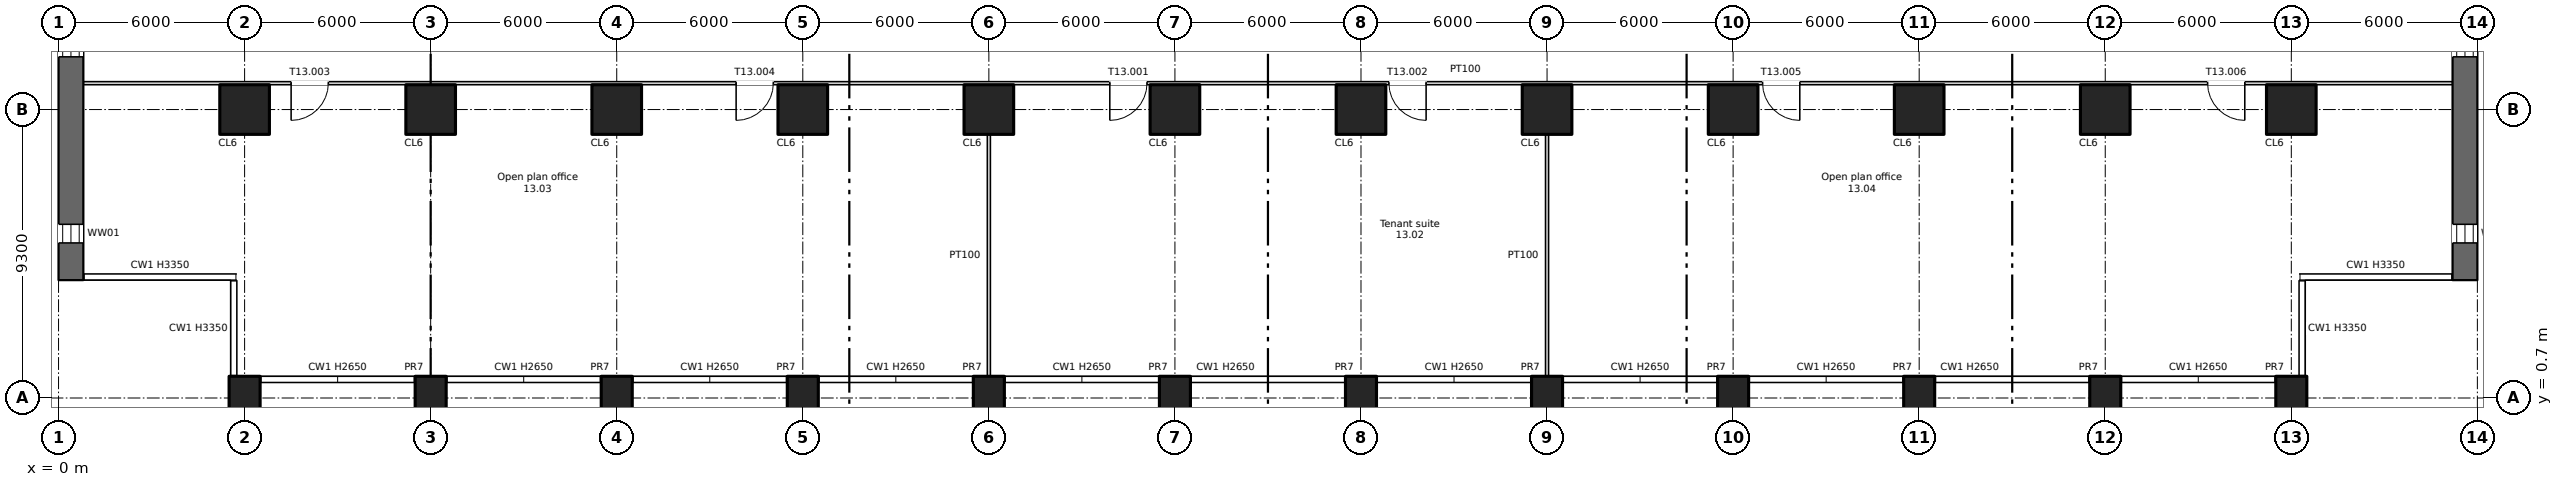
"""IFC4 building model, lengths in metres.
Left out: names, types, materials, properties, quantities, classifications, styles, units other than length and angle.
Written with IfcOpenShell. Run it as: python <this file> out.ifc"""

import sys

from ifc_helpers import new_model, si_unit, direction, frame, frame_2d, origin, origin_2d, place, context, subcontext, project, spatial, rectangle, extrude, element, fill, save


model = new_model("IFC4")
c1 = context("Model", 3, precision=1e-05, world=origin(), true_north=direction((0.0, 1.0)))
c2 = subcontext(c1, "Body", "Model", "MODEL_VIEW")
j1 = project(units=[si_unit("LENGTHUNIT", "METRE"), si_unit("PLANEANGLEUNIT", "RADIAN")], contexts=[c1])
p1 = place(None, origin())
s1 = spatial("IfcSite", under=j1, at=p1, CompositionType="ELEMENT")
p2 = place(p1, origin())
s2 = spatial("IfcBuilding", under=s1, at=p2, CompositionType="ELEMENT")
p3 = place(p2, frame((0.0, 0.0, 67.5)))
s3 = spatial("IfcBuildingStorey", under=s2, at=p3, CompositionType="ELEMENT", Elevation=67.5)
for number, where, z_axis, x_axis in (
    (1, (6.0, 0.7, -0.4), (0.0, 0.0, 1.0), (1.0, 0.0, 0.0)),
    (2, (12.0, 0.7, -0.4), (0.0, 0.0, 1.0), (1.0, 0.0, 0.0)),
    (3, (18.0, 0.7, -0.4), (0.0, 0.0, 1.0), (1.0, 0.0, 0.0)),
    (4, (24.0, 0.7, -0.4), (0.0, 0.0, 1.0), (1.0, 0.0, 0.0)),
    (5, (30.0, 0.7, -0.4), (0.0, 0.0, 1.0), (1.0, 0.0, 0.0)),
    (6, (36.0, 0.7, -0.4), (0.0, 0.0, 1.0), (1.0, 0.0, 0.0)),
    (7, (42.0, 0.7, -0.4), (0.0, 0.0, 1.0), (1.0, 0.0, 0.0)),
    (8, (48.0, 0.7, -0.4), (0.0, 0.0, 1.0), (1.0, 0.0, 0.0)),
    (9, (54.0, 0.7, -0.4), (0.0, 0.0, 1.0), (1.0, 0.0, 0.0)),
    (10, (60.0, 0.7, -0.4), (0.0, 0.0, 1.0), (1.0, 0.0, 0.0)),
    (11, (66.0, 0.7, -0.4), (0.0, 0.0, 1.0), (1.0, 0.0, 0.0)),
    (12, (72.0, 0.7, -0.4), (0.0, 0.0, 1.0), (1.0, 0.0, 0.0)),
):
    element("IfcColumn", number, at=place(p3, frame(where, z_axis=z_axis, x_axis=x_axis)), inside=s3, PredefinedType="COLUMN", context=c2, shape_type="SweptSolid", body=[
        extrude(rectangle(XDim=1.0, YDim=1.4, at=origin_2d()), origin(), (0.0, 0.0, 1.0), 3.75),
    ])
for number, where, z_axis, x_axis in (
    (13, (6.0, 10.0, 0.0), (0.0, 0.0, 1.0), (1.0, 0.0, 0.0)),
    (14, (12.0, 10.0, 0.0), (0.0, 0.0, 1.0), (1.0, 0.0, 0.0)),
    (15, (18.0, 10.0, 0.0), (0.0, 0.0, 1.0), (1.0, 0.0, 0.0)),
    (16, (24.0, 10.0, 0.0), (0.0, 0.0, 1.0), (1.0, 0.0, 0.0)),
    (17, (30.0, 10.0, 0.0), (0.0, 0.0, 1.0), (1.0, 0.0, 0.0)),
    (18, (36.0, 10.0, 0.0), (0.0, 0.0, 1.0), (1.0, 0.0, 0.0)),
    (19, (42.0, 10.0, 0.0), (0.0, 0.0, 1.0), (1.0, 0.0, 0.0)),
    (20, (48.0, 10.0, 0.0), (0.0, 0.0, 1.0), (1.0, 0.0, 0.0)),
    (21, (54.0, 10.0, 0.0), (0.0, 0.0, 1.0), (1.0, 0.0, 0.0)),
    (22, (60.0, 10.0, 0.0), (0.0, 0.0, 1.0), (1.0, 0.0, 0.0)),
    (23, (66.0, 10.0, 0.0), (0.0, 0.0, 1.0), (1.0, 0.0, 0.0)),
    (24, (72.0, 10.0, 0.0), (0.0, 0.0, 1.0), (1.0, 0.0, 0.0)),
):
    element("IfcColumn", number, at=place(p3, frame(where, z_axis=z_axis, x_axis=x_axis)), inside=s3, PredefinedType="COLUMN", context=c2, shape_type="SweptSolid", body=[
        extrude(rectangle(XDim=1.6, YDim=1.6, at=origin_2d()), origin(), (0.0, 0.0, 1.0), 3.35),
    ])
p4 = place(p3, frame((0.4, 4.5, 0.0), z_axis=(0.0, 0.0, 1.0), x_axis=(0.0, 1.0, 0.0)))
e25 = element("IfcWall", 25, at=p4, inside=s3, PredefinedType="SHEAR", context=c2, shape_type="SweptSolid", body=[
    extrude(rectangle(XDim=37.0, YDim=0.8, at=frame_2d((18.5, 0.0))), origin(), (0.0, 0.0, 1.0), 3.35),
])
p5 = place(p4, frame((1.2, 0.0, 0.6)))
e26 = element("IfcOpeningElement", 26, at=p5, cuts=e25, PredefinedType="OPENING", context=c2, shape_type="SweptSolid", body=[
    extrude(rectangle(XDim=0.6, YDim=2.4, at=frame_2d((0.3, 1.2))), frame((0.0, 0.41, 0.0), z_axis=(0.0, -1.0, 0.0), x_axis=(1.0, 0.0, 0.0)), (0.0, 0.0, 1.0), 0.82),
])
p6 = place(p4, frame((7.2, 0.0, 0.6)))
e27 = element("IfcOpeningElement", 27, at=p6, cuts=e25, PredefinedType="OPENING", context=c2, shape_type="SweptSolid", body=[
    extrude(rectangle(XDim=0.6, YDim=2.4, at=frame_2d((0.3, 1.2))), frame((0.0, 0.41, 0.0), z_axis=(0.0, -1.0, 0.0), x_axis=(1.0, 0.0, 0.0)), (0.0, 0.0, 1.0), 0.82),
])
p7 = place(p4, frame((13.2, 0.0, 0.6)))
e28 = element("IfcOpeningElement", 28, at=p7, cuts=e25, PredefinedType="OPENING", context=c2, shape_type="SweptSolid", body=[
    extrude(rectangle(XDim=0.6, YDim=2.4, at=frame_2d((0.3, 1.2))), frame((0.0, 0.41, 0.0), z_axis=(0.0, -1.0, 0.0), x_axis=(1.0, 0.0, 0.0)), (0.0, 0.0, 1.0), 0.82),
])
p8 = place(p4, frame((19.2, 0.0, 0.6)))
e29 = element("IfcOpeningElement", 29, at=p8, cuts=e25, PredefinedType="OPENING", context=c2, shape_type="SweptSolid", body=[
    extrude(rectangle(XDim=0.6, YDim=2.4, at=frame_2d((0.3, 1.2))), frame((0.0, 0.41, 0.0), z_axis=(0.0, -1.0, 0.0), x_axis=(1.0, 0.0, 0.0)), (0.0, 0.0, 1.0), 0.82),
])
p9 = place(p4, frame((25.2, 0.0, 0.6)))
e30 = element("IfcOpeningElement", 30, at=p9, cuts=e25, PredefinedType="OPENING", context=c2, shape_type="SweptSolid", body=[
    extrude(rectangle(XDim=0.6, YDim=2.4, at=frame_2d((0.3, 1.2))), frame((0.0, 0.41, 0.0), z_axis=(0.0, -1.0, 0.0), x_axis=(1.0, 0.0, 0.0)), (0.0, 0.0, 1.0), 0.82),
])
p10 = place(p4, frame((31.2, 0.0, 0.6)))
e31 = element("IfcOpeningElement", 31, at=p10, cuts=e25, PredefinedType="OPENING", context=c2, shape_type="SweptSolid", body=[
    extrude(rectangle(XDim=0.6, YDim=2.4, at=frame_2d((0.3, 1.2))), frame((0.0, 0.41, 0.0), z_axis=(0.0, -1.0, 0.0), x_axis=(1.0, 0.0, 0.0)), (0.0, 0.0, 1.0), 0.82),
])
p11 = place(p3, frame((77.6, 4.5, 0.0), z_axis=(0.0, 0.0, 1.0), x_axis=(0.0, 1.0, 0.0)))
e32 = element("IfcWall", 32, at=p11, inside=s3, PredefinedType="SHEAR", context=c2, shape_type="SweptSolid", body=[
    extrude(rectangle(XDim=37.0, YDim=0.8, at=frame_2d((18.5, 0.0))), origin(), (0.0, 0.0, 1.0), 3.35),
])
p12 = place(p11, frame((1.2, 0.0, 0.6)))
e33 = element("IfcOpeningElement", 33, at=p12, cuts=e32, PredefinedType="OPENING", context=c2, shape_type="SweptSolid", body=[
    extrude(rectangle(XDim=0.6, YDim=2.4, at=frame_2d((0.3, 1.2))), frame((0.0, 0.41, 0.0), z_axis=(0.0, -1.0, 0.0), x_axis=(1.0, 0.0, 0.0)), (0.0, 0.0, 1.0), 0.82),
])
p13 = place(p11, frame((7.2, 0.0, 0.6)))
e34 = element("IfcOpeningElement", 34, at=p13, cuts=e32, PredefinedType="OPENING", context=c2, shape_type="SweptSolid", body=[
    extrude(rectangle(XDim=0.6, YDim=2.4, at=frame_2d((0.3, 1.2))), frame((0.0, 0.41, 0.0), z_axis=(0.0, -1.0, 0.0), x_axis=(1.0, 0.0, 0.0)), (0.0, 0.0, 1.0), 0.82),
])
p14 = place(p11, frame((13.2, 0.0, 0.6)))
e35 = element("IfcOpeningElement", 35, at=p14, cuts=e32, PredefinedType="OPENING", context=c2, shape_type="SweptSolid", body=[
    extrude(rectangle(XDim=0.6, YDim=2.4, at=frame_2d((0.3, 1.2))), frame((0.0, 0.41, 0.0), z_axis=(0.0, -1.0, 0.0), x_axis=(1.0, 0.0, 0.0)), (0.0, 0.0, 1.0), 0.82),
])
p15 = place(p11, frame((19.2, 0.0, 0.6)))
e36 = element("IfcOpeningElement", 36, at=p15, cuts=e32, PredefinedType="OPENING", context=c2, shape_type="SweptSolid", body=[
    extrude(rectangle(XDim=0.6, YDim=2.4, at=frame_2d((0.3, 1.2))), frame((0.0, 0.41, 0.0), z_axis=(0.0, -1.0, 0.0), x_axis=(1.0, 0.0, 0.0)), (0.0, 0.0, 1.0), 0.82),
])
p16 = place(p11, frame((25.2, 0.0, 0.6)))
e37 = element("IfcOpeningElement", 37, at=p16, cuts=e32, PredefinedType="OPENING", context=c2, shape_type="SweptSolid", body=[
    extrude(rectangle(XDim=0.6, YDim=2.4, at=frame_2d((0.3, 1.2))), frame((0.0, 0.41, 0.0), z_axis=(0.0, -1.0, 0.0), x_axis=(1.0, 0.0, 0.0)), (0.0, 0.0, 1.0), 0.82),
])
p17 = place(p11, frame((31.2, 0.0, 0.6)))
e38 = element("IfcOpeningElement", 38, at=p17, cuts=e32, PredefinedType="OPENING", context=c2, shape_type="SweptSolid", body=[
    extrude(rectangle(XDim=0.6, YDim=2.4, at=frame_2d((0.3, 1.2))), frame((0.0, 0.41, 0.0), z_axis=(0.0, -1.0, 0.0), x_axis=(1.0, 0.0, 0.0)), (0.0, 0.0, 1.0), 0.82),
])
p18 = place(p3, frame((0.8, 10.85, 0.0), z_axis=(0.0, 0.0, 1.0), x_axis=(1.0, 0.0, 0.0)))
e39 = element("IfcWall", 39, at=p18, inside=s3, PredefinedType="PARTITIONING", context=c2, shape_type="SweptSolid", body=[
    extrude(rectangle(XDim=76.4, YDim=0.1, at=frame_2d((38.2, 0.0))), origin(), (0.0, 0.0, 1.0), 3.35),
])
p19 = place(p18, frame((33.1, 0.0, 0.0)))
e40 = element("IfcOpeningElement", 40, at=p19, cuts=e39, PredefinedType="OPENING", context=c2, shape_type="SweptSolid", body=[
    extrude(rectangle(XDim=1.2, YDim=2.1, at=frame_2d((0.6, 1.05))), frame((0.0, 0.06, 0.0), z_axis=(0.0, -1.0, 0.0), x_axis=(1.0, 0.0, 0.0)), (0.0, 0.0, 1.0), 0.12),
])
p20 = place(p18, frame((42.1, 0.0, 0.0)))
e41 = element("IfcOpeningElement", 41, at=p20, cuts=e39, PredefinedType="OPENING", context=c2, shape_type="SweptSolid", body=[
    extrude(rectangle(XDim=1.2, YDim=2.1, at=frame_2d((0.6, 1.05))), frame((0.0, 0.06, 0.0), z_axis=(0.0, -1.0, 0.0), x_axis=(1.0, 0.0, 0.0)), (0.0, 0.0, 1.0), 0.12),
])
p21 = place(p18, frame((6.7, 0.0, 0.0)))
e42 = element("IfcOpeningElement", 42, at=p21, cuts=e39, PredefinedType="OPENING", context=c2, shape_type="SweptSolid", body=[
    extrude(rectangle(XDim=1.2, YDim=2.1, at=frame_2d((0.6, 1.05))), frame((0.0, 0.06, 0.0), z_axis=(0.0, -1.0, 0.0), x_axis=(1.0, 0.0, 0.0)), (0.0, 0.0, 1.0), 0.12),
])
p22 = place(p18, frame((21.05, 0.0, 0.0)))
e43 = element("IfcOpeningElement", 43, at=p22, cuts=e39, PredefinedType="OPENING", context=c2, shape_type="SweptSolid", body=[
    extrude(rectangle(XDim=1.2, YDim=2.1, at=frame_2d((0.6, 1.05))), frame((0.0, 0.06, 0.0), z_axis=(0.0, -1.0, 0.0), x_axis=(1.0, 0.0, 0.0)), (0.0, 0.0, 1.0), 0.12),
])
p23 = place(p18, frame((54.15, 0.0, 0.0)))
e44 = element("IfcOpeningElement", 44, at=p23, cuts=e39, PredefinedType="OPENING", context=c2, shape_type="SweptSolid", body=[
    extrude(rectangle(XDim=1.2, YDim=2.1, at=frame_2d((0.6, 1.05))), frame((0.0, 0.06, 0.0), z_axis=(0.0, -1.0, 0.0), x_axis=(1.0, 0.0, 0.0)), (0.0, 0.0, 1.0), 0.12),
])
p24 = place(p18, frame((68.5, 0.0, 0.0)))
e45 = element("IfcOpeningElement", 45, at=p24, cuts=e39, PredefinedType="OPENING", context=c2, shape_type="SweptSolid", body=[
    extrude(rectangle(XDim=1.2, YDim=2.1, at=frame_2d((0.6, 1.05))), frame((0.0, 0.06, 0.0), z_axis=(0.0, -1.0, 0.0), x_axis=(1.0, 0.0, 0.0)), (0.0, 0.0, 1.0), 0.12),
])
for number, where, z_axis, x_axis in (
    (46, (30.0, 1.4, 0.0), (0.0, 0.0, 1.0), (0.0, 1.0, 0.0)),
    (47, (48.0, 1.4, 0.0), (0.0, 0.0, 1.0), (0.0, 1.0, 0.0)),
):
    element("IfcWall", number, at=place(p3, frame(where, z_axis=z_axis, x_axis=x_axis)), inside=s3, PredefinedType="PARTITIONING", context=c2, shape_type="SweptSolid", body=[
        extrude(rectangle(XDim=7.8, YDim=0.1, at=frame_2d((3.9, 0.0))), origin(), (0.0, 0.0, 1.0), 3.35),
    ])
p25 = place(p5, origin())
e48 = element("IfcWindow", 48, at=p25, inside=s3, PartitioningType="SINGLE_PANEL", PredefinedType="WINDOW", context=c2, shape_type="SweptSolid", body=[
    extrude(rectangle(XDim=0.6, YDim=2.4, at=frame_2d((0.3, 1.2))), frame((0.0, 0.03, 0.0), z_axis=(0.0, -1.0, 0.0), x_axis=(1.0, 0.0, 0.0)), (0.0, 0.0, 1.0), 0.06),
])
fill(e26, e48)
p26 = place(p6, origin())
e49 = element("IfcWindow", 49, at=p26, inside=s3, PartitioningType="SINGLE_PANEL", PredefinedType="WINDOW", context=c2, shape_type="SweptSolid", body=[
    extrude(rectangle(XDim=0.6, YDim=2.4, at=frame_2d((0.3, 1.2))), frame((0.0, 0.03, 0.0), z_axis=(0.0, -1.0, 0.0), x_axis=(1.0, 0.0, 0.0)), (0.0, 0.0, 1.0), 0.06),
])
fill(e27, e49)
p27 = place(p12, origin())
e50 = element("IfcWindow", 50, at=p27, inside=s3, PartitioningType="SINGLE_PANEL", PredefinedType="WINDOW", context=c2, shape_type="SweptSolid", body=[
    extrude(rectangle(XDim=0.6, YDim=2.4, at=frame_2d((0.3, 1.2))), frame((0.0, 0.03, 0.0), z_axis=(0.0, -1.0, 0.0), x_axis=(1.0, 0.0, 0.0)), (0.0, 0.0, 1.0), 0.06),
])
fill(e33, e50)
p28 = place(p13, origin())
e51 = element("IfcWindow", 51, at=p28, inside=s3, PartitioningType="SINGLE_PANEL", PredefinedType="WINDOW", context=c2, shape_type="SweptSolid", body=[
    extrude(rectangle(XDim=0.6, YDim=2.4, at=frame_2d((0.3, 1.2))), frame((0.0, 0.03, 0.0), z_axis=(0.0, -1.0, 0.0), x_axis=(1.0, 0.0, 0.0)), (0.0, 0.0, 1.0), 0.06),
])
fill(e34, e51)
p29 = place(p19, origin())
e52 = element("IfcDoor", 52, at=p29, inside=s3, OperationType="SINGLE_SWING_LEFT", PredefinedType="DOOR", context=c2, shape_type="SweptSolid", body=[
    extrude(rectangle(XDim=1.2, YDim=2.1, at=frame_2d((0.6, 1.05))), frame((0.0, 0.025, 0.0), z_axis=(0.0, -1.0, 0.0), x_axis=(1.0, 0.0, 0.0)), (0.0, 0.0, 1.0), 0.05),
])
fill(e40, e52)
p30 = place(p20, origin())
e53 = element("IfcDoor", 53, at=p30, inside=s3, OperationType="SINGLE_SWING_RIGHT", PredefinedType="DOOR", context=c2, shape_type="SweptSolid", body=[
    extrude(rectangle(XDim=1.2, YDim=2.1, at=frame_2d((0.6, 1.05))), frame((0.0, 0.025, 0.0), z_axis=(0.0, -1.0, 0.0), x_axis=(1.0, 0.0, 0.0)), (0.0, 0.0, 1.0), 0.05),
])
fill(e41, e53)
p31 = place(p21, origin())
e54 = element("IfcDoor", 54, at=p31, inside=s3, OperationType="SINGLE_SWING_LEFT", PredefinedType="DOOR", context=c2, shape_type="SweptSolid", body=[
    extrude(rectangle(XDim=1.2, YDim=2.1, at=frame_2d((0.6, 1.05))), frame((0.0, 0.025, 0.0), z_axis=(0.0, -1.0, 0.0), x_axis=(1.0, 0.0, 0.0)), (0.0, 0.0, 1.0), 0.05),
])
fill(e42, e54)
p32 = place(p22, origin())
e55 = element("IfcDoor", 55, at=p32, inside=s3, OperationType="SINGLE_SWING_LEFT", PredefinedType="DOOR", context=c2, shape_type="SweptSolid", body=[
    extrude(rectangle(XDim=1.2, YDim=2.1, at=frame_2d((0.6, 1.05))), frame((0.0, 0.025, 0.0), z_axis=(0.0, -1.0, 0.0), x_axis=(1.0, 0.0, 0.0)), (0.0, 0.0, 1.0), 0.05),
])
fill(e43, e55)
p33 = place(p23, origin())
e56 = element("IfcDoor", 56, at=p33, inside=s3, OperationType="SINGLE_SWING_RIGHT", PredefinedType="DOOR", context=c2, shape_type="SweptSolid", body=[
    extrude(rectangle(XDim=1.2, YDim=2.1, at=frame_2d((0.6, 1.05))), frame((0.0, 0.025, 0.0), z_axis=(0.0, -1.0, 0.0), x_axis=(1.0, 0.0, 0.0)), (0.0, 0.0, 1.0), 0.05),
])
fill(e44, e56)
p34 = place(p24, origin())
e57 = element("IfcDoor", 57, at=p34, inside=s3, OperationType="SINGLE_SWING_RIGHT", PredefinedType="DOOR", context=c2, shape_type="SweptSolid", body=[
    extrude(rectangle(XDim=1.2, YDim=2.1, at=frame_2d((0.6, 1.05))), frame((0.0, 0.025, 0.0), z_axis=(0.0, -1.0, 0.0), x_axis=(1.0, 0.0, 0.0)), (0.0, 0.0, 1.0), 0.05),
])
fill(e45, e57)
save(model, sys.argv[1])
